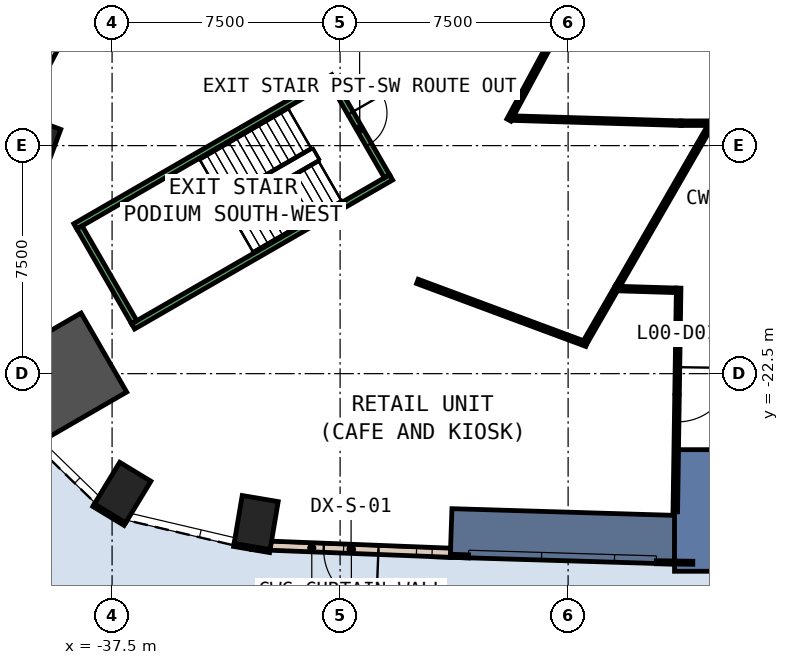
"""IFC4 building model, lengths in metres.
Left out: names, types, materials, properties, quantities, classifications, styles, units other than length and angle.
Written with IfcOpenShell. Run it as: python <this file> out.ifc"""

import sys

from ifc_helpers import new_model, si_unit, direction, frame, frame_2d, origin, origin_2d, place, context, subcontext, project, spatial, polyline, rectangle, outline, extrude, element, fill, save


model = new_model("IFC4")
c1 = context("Model", 3, precision=1e-05, world=origin(), true_north=direction((0.0, 1.0)))
c2 = subcontext(c1, "Body", "Model", "MODEL_VIEW")
j1 = project(units=[si_unit("LENGTHUNIT", "METRE"), si_unit("PLANEANGLEUNIT", "RADIAN")], contexts=[c1])
p1 = place(None, origin())
s1 = spatial("IfcSite", under=j1, at=p1, CompositionType="ELEMENT")
p2 = place(p1, origin())
s2 = spatial("IfcBuilding", under=s1, at=p2, CompositionType="ELEMENT")
p3 = place(p2, origin())
s3 = spatial("IfcBuildingStorey", under=s2, at=p3, CompositionType="ELEMENT", Elevation=0.0)
for number, where, z_axis, x_axis in (
    (1, (-32.761, -27.397, -0.5), (0.0, 0.0, 1.0), (-0.986, 0.167, 0.0)),
    (2, (-40.147, -14.751, -0.5), (0.0, 0.0, 1.0), (0.348, 0.937, 0.0)),
):
    element("IfcColumn", number, at=place(p3, frame(where, z_axis=z_axis, x_axis=x_axis)), inside=s3, PredefinedType="COLUMN", context=c2, shape_type="SweptSolid", body=[
        extrude(rectangle(XDim=1.2, YDim=1.6, at=origin_2d()), origin(), (0.0, 0.0, 1.0), 9.05),
    ])
p4 = place(p3, frame((-39.069, -22.556, -0.5), z_axis=(0.0, 0.0, 1.0), x_axis=(0.866025403784, 0.5, 0.0)))
e3 = element("IfcColumn", 3, at=p4, inside=s3, PredefinedType="COLUMN", context=c2, shape_type="SweptSolid", body=[
    extrude(rectangle(XDim=3.0, YDim=3.0, at=origin_2d()), origin(), (0.0, 0.0, 1.0), 9.05),
])
p5 = place(p3, frame((-37.152, -26.411, -0.5), z_axis=(0.0, 0.0, 1.0), x_axis=(-0.854522294989, 0.519414716163, 0.0)))
e4 = element("IfcColumn", 4, at=p5, inside=s3, PredefinedType="COLUMN", context=c2, shape_type="SweptSolid", body=[
    extrude(rectangle(XDim=1.2, YDim=1.6, at=origin_2d()), origin(), (0.0, 0.0, 1.0), 9.05),
])
p6 = place(p3, frame((0.0, 0.0, -0.5)))
e5 = element("IfcWall", 5, at=p6, inside=s3, PredefinedType="SHEAR", context=c2, shape_type="SweptSolid", body=[
    extrude(outline(polyline([(-26.377, -28.54), (-19.0, -28.762), (-18.976, -27.162), (-26.321, -26.941), (-26.377, -28.54)])), origin(), (0.0, 0.0, 1.0), 9.05),
])
p7 = place(p3, frame((-19.0, -25.0, 34.4), z_axis=(0.0, 1.0, 0.0), x_axis=(1.0, 0.0, 0.0)))
e6 = element("IfcWall", 6, at=p7, inside=s3, PredefinedType="SHEAR", context=c2, shape_type="SweptSolid", body=[
    extrude(outline(polyline([(0.0, 0.0), (38.0, 0.0), (38.0, 34.4), (34.0, 34.4), (34.0, 18.4), (33.062, 14.572), (32.125, 13.075), (31.188, 11.987), (30.25, 11.124), (29.312, 10.412), (28.375, 9.813), (27.438, 9.305), (26.5, 8.874), (25.562, 8.509), (24.625, 8.203), (23.688, 7.951), (22.75, 7.749), (21.812, 7.595), (20.875, 7.486), (19.938, 7.422), (19.0, 7.4), (18.062, 7.422), (17.125, 7.486), (16.188, 7.595), (15.25, 7.749), (14.312, 7.951), (13.375, 8.203), (12.438, 8.509), (11.5, 8.874), (10.562, 9.305), (9.625, 9.813), (8.688, 10.412), (7.75, 11.124), (6.812, 11.987), (5.875, 13.075), (4.938, 14.572), (4.0, 18.4), (4.0, 34.4), (0.0, 34.4), (0.0, 0.0)])), origin(), (0.0, 0.0, -1.0), 4.0),
])
p8 = place(p3, frame((-33.494, -28.135, 0.0), z_axis=(0.0, 0.0, 1.0), x_axis=(0.986011774526, -0.166675674579, 0.0)))
e7 = element("IfcWall", 7, at=p8, inside=s3, PredefinedType="STANDARD", context=c2, shape_type="SweptSolid", body=[
    extrude(rectangle(XDim=1.2, YDim=0.1, at=frame_2d((0.6, 0.0))), origin(), (0.0, 0.0, 1.0), 8.55),
])
p9 = place(p3, frame((-26.975, -28.469, 0.0), z_axis=(0.0, 0.0, 1.0), x_axis=(0.999387493042, -0.034994838926, 0.0)))
e8 = element("IfcWall", 8, at=p9, inside=s3, PredefinedType="STANDARD", context=c2, shape_type="SweptSolid", body=[
    extrude(rectangle(XDim=1.2, YDim=0.1, at=frame_2d((0.6, 0.0))), origin(), (0.0, 0.0, 1.0), 8.55),
])
p10 = place(p3, frame((-19.599, -28.703, 0.0), z_axis=(0.0, 0.0, 1.0), x_axis=(0.999886724523, -0.015051183404, 0.0)))
e9 = element("IfcWall", 9, at=p10, inside=s3, PredefinedType="STANDARD", context=c2, shape_type="SweptSolid", body=[
    extrude(rectangle(XDim=1.2, YDim=0.1, at=frame_2d((0.6, 0.0))), origin(), (0.0, 0.0, 1.0), 8.55),
])
p11 = place(p3, frame((-38.106, -26.826, 0.0), z_axis=(0.0, 0.0, 1.0), x_axis=(0.854716608594, -0.519094903649, 0.0)))
e10 = element("IfcWall", 10, at=p11, inside=s3, PredefinedType="STANDARD", context=c2, shape_type="SweptSolid", body=[
    extrude(rectangle(XDim=1.2, YDim=0.1, at=frame_2d((0.6, 0.0))), origin(), (0.0, 0.0, 1.0), 8.55),
])
p12 = place(p3, frame((-26.37, -28.39, 0.0), z_axis=(0.0, 0.0, 1.0), x_axis=(-0.999234642094, 0.039116876654, 0.0)))
e11 = element("IfcWall", 11, at=p12, inside=s3, PredefinedType="STANDARD", context=c2, shape_type="SweptSolid", body=[
    extrude(rectangle(XDim=6.541, YDim=0.3, at=frame_2d((3.271, 0.0))), origin(), (0.0, 0.0, 1.0), 3.0),
])
p13 = place(p12, frame((2.371, 0.0, 0.0)))
e12 = element("IfcOpeningElement", 12, at=p13, cuts=e11, PredefinedType="OPENING", context=c2, shape_type="SweptSolid", body=[
    extrude(rectangle(XDim=1.8, YDim=2.4, at=frame_2d((0.9, 1.2))), frame((0.0, 0.16, 0.0), z_axis=(0.0, -1.0, 0.0), x_axis=(1.0, 0.0, 0.0)), (0.0, 0.0, 1.0), 0.32),
])
p14 = place(p3, frame((-40.859, -14.509, 0.0), z_axis=(0.0, 0.0, 1.0), x_axis=(0.466092300341, 0.88473610052, 0.0)))
e13 = element("IfcWall", 13, at=p14, inside=s3, PredefinedType="STANDARD", context=c2, shape_type="SweptSolid", body=[
    extrude(rectangle(XDim=7.389, YDim=0.3, at=frame_2d((3.694, 0.0))), origin(), (0.0, 0.0, 1.0), 3.0),
])
p15 = place(p14, frame((2.794, 0.0, 0.0)))
e14 = element("IfcOpeningElement", 14, at=p15, cuts=e13, PredefinedType="OPENING", context=c2, shape_type="SweptSolid", body=[
    extrude(rectangle(XDim=1.8, YDim=2.4, at=frame_2d((0.9, 1.2))), frame((0.0, 0.16, 0.0), z_axis=(0.0, -1.0, 0.0), x_axis=(1.0, 0.0, 0.0)), (0.0, 0.0, 1.0), 0.32),
])
p16 = place(p3, frame((-20.881, -19.635, 0.0), z_axis=(0.0, 0.0, 1.0), x_axis=(-0.50001262068, -0.866018117109, 0.0)))
e15 = element("IfcWall", 15, at=p16, inside=s3, PredefinedType="PARTITIONING", context=c2, shape_type="SweptSolid", body=[
    extrude(rectangle(XDim=2.088, YDim=0.15, at=frame_2d((1.044, 0.0))), origin(), (0.0, 0.0, 1.0), 8.55),
])
p17 = place(p3, frame((-21.892, -21.534, 0.0), z_axis=(0.0, 0.0, 1.0), x_axis=(-0.937429874282, 0.348174138619, 0.0)))
e16 = element("IfcWall", 16, at=p17, inside=s3, PredefinedType="PARTITIONING", context=c2, shape_type="SweptSolid", body=[
    extrude(rectangle(XDim=5.936, YDim=0.15, at=frame_2d((2.968, 0.0))), origin(), (0.0, 0.0, 1.0), 8.55),
])
p18 = place(p3, frame((-21.344, -8.403, 0.0), z_axis=(0.0, 0.0, 1.0), x_axis=(-0.474656303591, -0.880171229626, 0.0)))
e17 = element("IfcWall", 17, at=p18, inside=s3, PredefinedType="PARTITIONING", context=c2, shape_type="SweptSolid", body=[
    extrude(rectangle(XDim=6.54, YDim=0.15, at=frame_2d((3.27, 0.0))), origin(), (0.0, 0.0, 1.0), 8.55),
])
p19 = place(p3, frame((-24.337, -14.095, 0.0), z_axis=(0.0, 0.0, 1.0), x_axis=(0.999548445021, -0.030048395218, 0.0)))
e18 = element("IfcWall", 18, at=p19, inside=s3, PredefinedType="PARTITIONING", context=c2, shape_type="SweptSolid", body=[
    extrude(rectangle(XDim=5.557, YDim=0.15, at=frame_2d((2.779, 0.0))), origin(), (0.0, 0.0, 1.0), 8.55),
])
p20 = place(p3, frame((-18.782, -14.262, 0.0), z_axis=(0.0, 0.0, 1.0), x_axis=(1.0, 0.0, 0.0)))
e19 = element("IfcWall", 19, at=p20, inside=s3, PredefinedType="PARTITIONING", context=c2, shape_type="SweptSolid", body=[
    extrude(rectangle(XDim=0.926, YDim=0.15, at=frame_2d((0.463, 0.0))), origin(), (0.0, 0.0, 1.0), 8.55),
])
p21 = place(p3, frame((-17.744, -14.197, 0.0), z_axis=(0.0, 0.0, 1.0), x_axis=(-0.499711231596, -0.866192060121, 0.0)))
e20 = element("IfcWall", 20, at=p21, inside=s3, PredefinedType="PARTITIONING", context=c2, shape_type="SweptSolid", body=[
    extrude(rectangle(XDim=6.278, YDim=0.15, at=frame_2d((3.139, 0.0))), origin(), (0.0, 0.0, 1.0), 8.55),
])
p22 = place(p3, frame((-20.844, -19.702, 0.0), z_axis=(0.0, 0.0, 1.0), x_axis=(0.999534689479, -0.030502533158, 0.0)))
e21 = element("IfcWall", 21, at=p22, inside=s3, PredefinedType="PARTITIONING", context=c2, shape_type="SweptSolid", body=[
    extrude(rectangle(XDim=1.905, YDim=0.15, at=frame_2d((0.953, 0.0))), origin(), (0.0, 0.0, 1.0), 8.55),
])
p23 = place(p3, frame((-18.864, -19.687, 0.0), z_axis=(0.0, 0.0, 1.0), x_axis=(-0.015101510801, -0.999885965684, 0.0)))
e22 = element("IfcWall", 22, at=p23, inside=s3, PredefinedType="PARTITIONING", context=c2, shape_type="SweptSolid", body=[
    extrude(rectangle(XDim=7.356, YDim=0.15, at=frame_2d((3.678, 0.0))), origin(), (0.0, 0.0, 1.0), 8.55),
])
p24 = place(p23, frame((2.6, 0.0, 0.0)))
e23 = element("IfcOpeningElement", 23, at=p24, cuts=e22, PredefinedType="OPENING", context=c2, shape_type="SweptSolid", body=[
    extrude(rectangle(XDim=1.8, YDim=2.1, at=frame_2d((0.9, 1.05))), frame((0.0, 0.085, 0.0), z_axis=(0.0, -1.0, 0.0), x_axis=(1.0, 0.0, 0.0)), (0.0, 0.0, 1.0), 0.17),
])
for number, where, z_axis, x_axis in (
    (24, (-30.222, -12.755, 0.0), (0.0, 0.0, 1.0), (-0.866, -0.5, 0.0)),
    (25, (-28.322, -16.045, 0.0), (0.0, 0.0, 1.0), (-0.866, -0.5, 0.0)),
):
    element("IfcWall", number, at=place(p3, frame(where, z_axis=z_axis, x_axis=x_axis)), inside=s3, PredefinedType="STANDARD", context=c2, shape_type="SweptSolid", body=[
        extrude(rectangle(XDim=9.8, YDim=0.2, at=frame_2d((4.9, 0.0))), origin(), (0.0, 0.0, 1.0), 8.55),
    ])
p25 = place(p3, frame((-30.258, -12.891, 0.0), z_axis=(0.0, 0.0, 1.0), x_axis=(0.499982693035, -0.866035395735, 0.0)))
e26 = element("IfcWall", 26, at=p25, inside=s3, PredefinedType="STANDARD", context=c2, shape_type="SweptSolid", body=[
    extrude(rectangle(XDim=3.6, YDim=0.2, at=frame_2d((1.8, 0.0))), origin(), (0.0, 0.0, 1.0), 8.55),
])
p26 = place(p25, frame((1.2, 0.0, 0.0)))
e27 = element("IfcOpeningElement", 27, at=p26, cuts=e26, PredefinedType="OPENING", context=c2, shape_type="SweptSolid", body=[
    extrude(rectangle(XDim=1.2, YDim=2.2, at=frame_2d((0.6, 1.1))), frame((0.0, 0.11, 0.0), z_axis=(0.0, -1.0, 0.0), x_axis=(1.0, 0.0, 0.0)), (0.0, 0.0, 1.0), 0.22),
])
p27 = place(p3, frame((-38.572, -17.691, 0.0), z_axis=(0.0, 0.0, 1.0), x_axis=(0.49995333141, -0.866052346231, 0.0)))
e28 = element("IfcWall", 28, at=p27, inside=s3, PredefinedType="STANDARD", context=c2, shape_type="SweptSolid", body=[
    extrude(rectangle(XDim=3.6, YDim=0.2, at=frame_2d((1.8, 0.0))), origin(), (0.0, 0.0, 1.0), 8.55),
])
p28 = place(p13, origin())
e29 = element("IfcDoor", 29, at=p28, inside=s3, OperationType="DOUBLE_DOOR_SINGLE_SWING", PredefinedType="DOOR", context=c2, shape_type="SweptSolid", body=[
    extrude(rectangle(XDim=1.8, YDim=2.4, at=frame_2d((0.9, 1.2))), frame((0.0, 0.025, 0.0), z_axis=(0.0, -1.0, 0.0), x_axis=(1.0, 0.0, 0.0)), (0.0, 0.0, 1.0), 0.05),
])
fill(e12, e29)
p29 = place(p15, origin())
e30 = element("IfcDoor", 30, at=p29, inside=s3, OperationType="DOUBLE_DOOR_SINGLE_SWING", PredefinedType="DOOR", context=c2, shape_type="SweptSolid", body=[
    extrude(rectangle(XDim=1.8, YDim=2.4, at=frame_2d((0.9, 1.2))), frame((0.0, 0.025, 0.0), z_axis=(0.0, -1.0, 0.0), x_axis=(1.0, 0.0, 0.0)), (0.0, 0.0, 1.0), 0.05),
])
fill(e14, e30)
p30 = place(p24, origin())
e31 = element("IfcDoor", 31, at=p30, inside=s3, OperationType="DOUBLE_DOOR_SINGLE_SWING", PredefinedType="DOOR", context=c2, shape_type="SweptSolid", body=[
    extrude(rectangle(XDim=1.8, YDim=2.1, at=frame_2d((0.9, 1.05))), frame((0.0, 0.025, 0.0), z_axis=(0.0, -1.0, 0.0), x_axis=(1.0, 0.0, 0.0)), (0.0, 0.0, 1.0), 0.05),
])
fill(e23, e31)
p31 = place(p26, origin())
e32 = element("IfcDoor", 32, at=p31, inside=s3, OperationType="SINGLE_SWING_LEFT", PredefinedType="DOOR", context=c2, shape_type="SweptSolid", body=[
    extrude(rectangle(XDim=1.2, YDim=2.2, at=frame_2d((0.6, 1.1))), frame((0.0, 0.025, 0.0), z_axis=(0.0, -1.0, 0.0), x_axis=(1.0, 0.0, 0.0)), (0.0, 0.0, 1.0), 0.05),
])
fill(e27, e32)
save(model, sys.argv[1])
